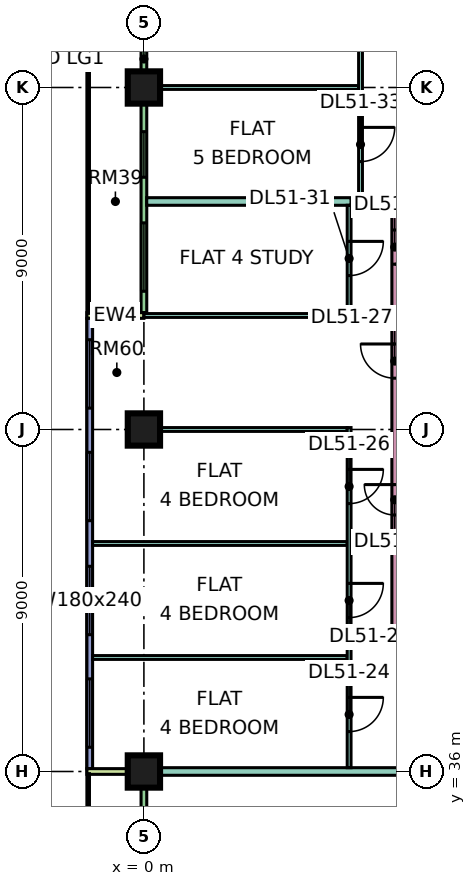
"""IFC4 building model, lengths in metres.
Left out: names, types, materials, properties, quantities, classifications, styles, units other than length and angle.
Written with IfcOpenShell. Run it as: python <this file> out.ifc"""

import sys

from ifc_helpers import new_model, si_unit, direction, frame, frame_2d, origin, origin_2d, place, context, subcontext, project, spatial, rectangle, extrude, element, fill, save


model = new_model("IFC4")
c1 = context("Model", 3, precision=1e-05, world=origin(), true_north=direction((0.0, 1.0)))
c2 = subcontext(c1, "Body", "Model", "MODEL_VIEW")
j1 = project(units=[si_unit("LENGTHUNIT", "METRE"), si_unit("PLANEANGLEUNIT", "RADIAN")], contexts=[c1])
p1 = place(None, origin())
s1 = spatial("IfcSite", under=j1, at=p1, CompositionType="ELEMENT")
p2 = place(p1, origin())
s2 = spatial("IfcBuilding", under=s1, at=p2, CompositionType="ELEMENT")
p3 = place(p2, frame((0.0, 0.0, 219.15)))
s3 = spatial("IfcBuildingStorey", under=s2, at=p3, CompositionType="ELEMENT", Elevation=219.15)
p4 = place(p3, frame((0.0, 36.0, 0.0), z_axis=(0.0, 0.0, 1.0), x_axis=(1.0, 0.0, 0.0)))
e1 = element("IfcColumn", 1, at=p4, inside=s3, PredefinedType="COLUMN", context=c2, shape_type="SweptSolid", body=[
    extrude(rectangle(XDim=0.85, YDim=0.85, at=origin_2d()), origin(), (0.0, 0.0, 1.0), 3.75),
])
p5 = place(p3, frame((0.0, 45.0, 0.0), z_axis=(0.0, 0.0, 1.0), x_axis=(1.0, 0.0, 0.0)))
e2 = element("IfcColumn", 2, at=p5, inside=s3, PredefinedType="COLUMN", context=c2, shape_type="SweptSolid", body=[
    extrude(rectangle(XDim=0.85, YDim=0.85, at=origin_2d()), origin(), (0.0, 0.0, 1.0), 3.75),
])
p6 = place(p3, frame((0.0, 54.0, 0.0), z_axis=(0.0, 0.0, 1.0), x_axis=(1.0, 0.0, 0.0)))
e3 = element("IfcColumn", 3, at=p6, inside=s3, PredefinedType="COLUMN", context=c2, shape_type="SweptSolid", body=[
    extrude(rectangle(XDim=0.85, YDim=0.85, at=origin_2d()), origin(), (0.0, 0.0, 1.0), 3.75),
])
p7 = place(p3, frame((0.0, 61.425, 0.0), z_axis=(0.0, 0.0, 1.0), x_axis=(0.0, -1.0, 0.0)))
e4 = element("IfcWall", 4, at=p7, inside=s3, PredefinedType="SOLIDWALL", context=c2, shape_type="SweptSolid", body=[
    extrude(rectangle(XDim=13.35, YDim=0.15, at=frame_2d((6.675, 0.0))), origin(), (0.0, 0.0, 1.0), 3.35),
])
p8 = place(p7, frame((2.025, 0.0, 0.0)))
e5 = element("IfcOpeningElement", 5, at=p8, cuts=e4, PredefinedType="OPENING", context=c2, shape_type="SweptSolid", body=[
    extrude(rectangle(XDim=1.8, YDim=2.4, at=frame_2d((0.9, 1.2))), frame((0.0, 0.085, 0.0), z_axis=(0.0, -1.0, 0.0), x_axis=(1.0, 0.0, 0.0)), (0.0, 0.0, 1.0), 0.17),
])
p9 = place(p7, frame((5.062, 0.0, 0.45)))
e6 = element("IfcOpeningElement", 6, at=p9, cuts=e4, PredefinedType="OPENING", context=c2, shape_type="SweptSolid", body=[
    extrude(rectangle(XDim=1.2, YDim=2.4, at=frame_2d((0.6, 1.2))), frame((0.0, 0.085, 0.0), z_axis=(0.0, -1.0, 0.0), x_axis=(1.0, 0.0, 0.0)), (0.0, 0.0, 1.0), 0.17),
])
p10 = place(p7, frame((8.587, 0.0, 0.45)))
e7 = element("IfcOpeningElement", 7, at=p10, cuts=e4, PredefinedType="OPENING", context=c2, shape_type="SweptSolid", body=[
    extrude(rectangle(XDim=1.2, YDim=2.4, at=frame_2d((0.6, 1.2))), frame((0.0, 0.085, 0.0), z_axis=(0.0, -1.0, 0.0), x_axis=(1.0, 0.0, 0.0)), (0.0, 0.0, 1.0), 0.17),
])
p11 = place(p7, frame((10.988, 0.0, 0.45)))
e8 = element("IfcOpeningElement", 8, at=p11, cuts=e4, PredefinedType="OPENING", context=c2, shape_type="SweptSolid", body=[
    extrude(rectangle(XDim=1.8, YDim=2.4, at=frame_2d((0.9, 1.2))), frame((0.0, 0.085, 0.0), z_axis=(0.0, -1.0, 0.0), x_axis=(1.0, 0.0, 0.0)), (0.0, 0.0, 1.0), 0.17),
])
p12 = place(p3, frame((-1.5, 48.0, 0.0), z_axis=(0.0, 0.0, 1.0), x_axis=(1.0, 0.0, 0.0)))
e9 = element("IfcWall", 9, at=p12, inside=s3, PredefinedType="SOLIDWALL", context=c2, shape_type="SweptSolid", body=[
    extrude(rectangle(XDim=1.5, YDim=0.15, at=frame_2d((0.75, 0.0))), origin(), (0.0, 0.0, 1.0), 3.35),
])
p13 = place(p3, frame((-1.425, 47.925, 0.0), z_axis=(0.0, 0.0, 1.0), x_axis=(0.0, -1.0, 0.0)))
e10 = element("IfcWall", 10, at=p13, inside=s3, PredefinedType="SOLIDWALL", context=c2, shape_type="SweptSolid", body=[
    extrude(rectangle(XDim=11.85, YDim=0.15, at=frame_2d((5.925, 0.0))), origin(), (0.0, 0.0, 1.0), 3.35),
])
p14 = place(p13, frame((0.562, 0.0, 0.45)))
e11 = element("IfcOpeningElement", 11, at=p14, cuts=e10, PredefinedType="OPENING", context=c2, shape_type="SweptSolid", body=[
    extrude(rectangle(XDim=1.8, YDim=2.4, at=frame_2d((0.9, 1.2))), frame((0.0, 0.085, 0.0), z_axis=(0.0, -1.0, 0.0), x_axis=(1.0, 0.0, 0.0)), (0.0, 0.0, 1.0), 0.17),
])
p15 = place(p13, frame((3.525, 0.0, 0.45)))
e12 = element("IfcOpeningElement", 12, at=p15, cuts=e10, PredefinedType="OPENING", context=c2, shape_type="SweptSolid", body=[
    extrude(rectangle(XDim=1.8, YDim=2.4, at=frame_2d((0.9, 1.2))), frame((0.0, 0.085, 0.0), z_axis=(0.0, -1.0, 0.0), x_axis=(1.0, 0.0, 0.0)), (0.0, 0.0, 1.0), 0.17),
])
p16 = place(p13, frame((6.525, 0.0, 0.45)))
e13 = element("IfcOpeningElement", 13, at=p16, cuts=e10, PredefinedType="OPENING", context=c2, shape_type="SweptSolid", body=[
    extrude(rectangle(XDim=1.8, YDim=2.4, at=frame_2d((0.9, 1.2))), frame((0.0, 0.085, 0.0), z_axis=(0.0, -1.0, 0.0), x_axis=(1.0, 0.0, 0.0)), (0.0, 0.0, 1.0), 0.17),
])
p17 = place(p13, frame((9.488, 0.0, 0.45)))
e14 = element("IfcOpeningElement", 14, at=p17, cuts=e10, PredefinedType="OPENING", context=c2, shape_type="SweptSolid", body=[
    extrude(rectangle(XDim=1.8, YDim=2.4, at=frame_2d((0.9, 1.2))), frame((0.0, 0.085, 0.0), z_axis=(0.0, -1.0, 0.0), x_axis=(1.0, 0.0, 0.0)), (0.0, 0.0, 1.0), 0.17),
])
p18 = place(p3, frame((0.0, 35.925, 0.0), z_axis=(0.0, 0.0, 1.0), x_axis=(0.0, -1.0, 0.0)))
e15 = element("IfcWall", 15, at=p18, inside=s3, PredefinedType="SOLIDWALL", context=c2, shape_type="SweptSolid", body=[
    extrude(rectangle(XDim=11.85, YDim=0.15, at=frame_2d((5.925, 0.0))), origin(), (0.0, 0.0, 1.0), 3.35),
])
p19 = place(p18, frame((2.288, 0.0, 0.0)))
e16 = element("IfcOpeningElement", 16, at=p19, cuts=e15, PredefinedType="OPENING", context=c2, shape_type="SweptSolid", body=[
    extrude(rectangle(XDim=1.8, YDim=2.4, at=frame_2d((0.9, 1.2))), frame((0.0, 0.085, 0.0), z_axis=(0.0, -1.0, 0.0), x_axis=(1.0, 0.0, 0.0)), (0.0, 0.0, 1.0), 0.17),
])
p20 = place(p18, frame((6.525, 0.0, 0.45)))
e17 = element("IfcOpeningElement", 17, at=p20, cuts=e15, PredefinedType="OPENING", context=c2, shape_type="SweptSolid", body=[
    extrude(rectangle(XDim=1.8, YDim=2.4, at=frame_2d((0.9, 1.2))), frame((0.0, 0.085, 0.0), z_axis=(0.0, -1.0, 0.0), x_axis=(1.0, 0.0, 0.0)), (0.0, 0.0, 1.0), 0.17),
])
p21 = place(p18, frame((9.562, 0.0, 0.45)))
e18 = element("IfcOpeningElement", 18, at=p21, cuts=e15, PredefinedType="OPENING", context=c2, shape_type="SweptSolid", body=[
    extrude(rectangle(XDim=1.2, YDim=2.4, at=frame_2d((0.6, 1.2))), frame((0.0, 0.085, 0.0), z_axis=(0.0, -1.0, 0.0), x_axis=(1.0, 0.0, 0.0)), (0.0, 0.0, 1.0), 0.17),
])
p22 = place(p3, frame((-1.5, 36.0, 0.0), z_axis=(0.0, 0.0, 1.0), x_axis=(1.0, 0.0, 0.0)))
e19 = element("IfcWall", 19, at=p22, inside=s3, PredefinedType="SOLIDWALL", context=c2, shape_type="SweptSolid", body=[
    extrude(rectangle(XDim=1.5, YDim=0.15, at=frame_2d((0.75, 0.0))), origin(), (0.0, 0.0, 1.0), 3.35),
])
for number, where, z_axis, x_axis in (
    (20, (-1.351, 39.0, 0.0), (0.0, 0.0, 1.0), (1.0, 0.0, 0.0)),
    (21, (-1.351, 42.0, 0.0), (0.0, 0.0, 1.0), (1.0, 0.0, 0.0)),
):
    element("IfcWall", number, at=place(p3, frame(where, z_axis=z_axis, x_axis=x_axis)), inside=s3, PredefinedType="PARTITIONING", context=c2, shape_type="SweptSolid", body=[
        extrude(rectangle(XDim=6.701, YDim=0.1, at=frame_2d((3.351, 0.0))), origin(), (0.0, 0.0, 1.0), 3.35),
    ])
e22 = element("IfcWall", 22, at=p4, inside=s3, PredefinedType="PARTITIONING", context=c2, shape_type="SweptSolid", body=[
    extrude(rectangle(XDim=9.5, YDim=0.2, at=frame_2d((4.75, 0.0))), origin(), (0.0, 0.0, 1.0), 3.35),
])
e23 = element("IfcWall", 23, at=p5, inside=s3, PredefinedType="PARTITIONING", context=c2, shape_type="SweptSolid", body=[
    extrude(rectangle(XDim=5.35, YDim=0.1, at=frame_2d((2.675, 0.0))), origin(), (0.0, 0.0, 1.0), 3.35),
])
p23 = place(p3, frame((0.0, 48.0, 0.0), z_axis=(0.0, 0.0, 1.0), x_axis=(1.0, 0.0, 0.0)))
e24 = element("IfcWall", 24, at=p23, inside=s3, PredefinedType="PARTITIONING", context=c2, shape_type="SweptSolid", body=[
    extrude(rectangle(XDim=5.45, YDim=0.1, at=frame_2d((2.725, 0.0))), origin(), (0.0, 0.0, 1.0), 3.35),
])
p24 = place(p3, frame((0.074, 51.0, 0.0), z_axis=(0.0, 0.0, 1.0), x_axis=(1.0, 0.0, 0.0)))
e25 = element("IfcWall", 25, at=p24, inside=s3, PredefinedType="PARTITIONING", context=c2, shape_type="SweptSolid", body=[
    extrude(rectangle(XDim=5.376, YDim=0.2, at=frame_2d((2.688, 0.0))), origin(), (0.0, 0.0, 1.0), 3.35),
])
p25 = place(p3, frame((0.074, 54.0, 0.0), z_axis=(0.0, 0.0, 1.0), x_axis=(1.0, 0.0, 0.0)))
e26 = element("IfcWall", 26, at=p25, inside=s3, PredefinedType="PARTITIONING", context=c2, shape_type="SweptSolid", body=[
    extrude(rectangle(XDim=5.576, YDim=0.1, at=frame_2d((2.788, 0.0))), origin(), (0.0, 0.0, 1.0), 3.35),
])
p26 = place(p3, frame((5.4, 36.1, 0.0), z_axis=(0.0, 0.0, 1.0), x_axis=(0.0, 1.0, 0.0)))
e27 = element("IfcWall", 27, at=p26, inside=s3, PredefinedType="PARTITIONING", context=c2, shape_type="SweptSolid", body=[
    extrude(rectangle(XDim=8.95, YDim=0.1, at=frame_2d((4.475, 0.0))), origin(), (0.0, 0.0, 1.0), 3.35),
])
p27 = place(p26, frame((0.95, 0.0, 0.0)))
e28 = element("IfcOpeningElement", 28, at=p27, cuts=e27, PredefinedType="OPENING", context=c2, shape_type="SweptSolid", body=[
    extrude(rectangle(XDim=0.9, YDim=2.1, at=frame_2d((0.45, 1.05))), frame((0.0, 0.06, 0.0), z_axis=(0.0, -1.0, 0.0), x_axis=(1.0, 0.0, 0.0)), (0.0, 0.0, 1.0), 0.12),
])
p28 = place(p26, frame((3.95, 0.0, 0.0)))
e29 = element("IfcOpeningElement", 29, at=p28, cuts=e27, PredefinedType="OPENING", context=c2, shape_type="SweptSolid", body=[
    extrude(rectangle(XDim=0.9, YDim=2.1, at=frame_2d((0.45, 1.05))), frame((0.0, 0.06, 0.0), z_axis=(0.0, -1.0, 0.0), x_axis=(1.0, 0.0, 0.0)), (0.0, 0.0, 1.0), 0.12),
])
p29 = place(p26, frame((6.95, 0.0, 0.0)))
e30 = element("IfcOpeningElement", 30, at=p29, cuts=e27, PredefinedType="OPENING", context=c2, shape_type="SweptSolid", body=[
    extrude(rectangle(XDim=0.9, YDim=2.1, at=frame_2d((0.45, 1.05))), frame((0.0, 0.06, 0.0), z_axis=(0.0, -1.0, 0.0), x_axis=(1.0, 0.0, 0.0)), (0.0, 0.0, 1.0), 0.12),
])
p30 = place(p3, frame((5.4, 48.05, 0.0), z_axis=(0.0, 0.0, 1.0), x_axis=(0.0, 1.0, 0.0)))
e31 = element("IfcWall", 31, at=p30, inside=s3, PredefinedType="PARTITIONING", context=c2, shape_type="SweptSolid", body=[
    extrude(rectangle(XDim=2.85, YDim=0.1, at=frame_2d((1.425, 0.0))), origin(), (0.0, 0.0, 1.0), 3.35),
])
p31 = place(p30, frame((1.0, 0.0, 0.0)))
e32 = element("IfcOpeningElement", 32, at=p31, cuts=e31, PredefinedType="OPENING", context=c2, shape_type="SweptSolid", body=[
    extrude(rectangle(XDim=0.9, YDim=2.1, at=frame_2d((0.45, 1.05))), frame((0.0, 0.06, 0.0), z_axis=(0.0, -1.0, 0.0), x_axis=(1.0, 0.0, 0.0)), (0.0, 0.0, 1.0), 0.12),
])
p32 = place(p3, frame((5.65, 51.0, 0.0), z_axis=(0.0, 0.0, 1.0), x_axis=(1.0, 0.0, 0.0)))
e33 = element("IfcWall", 33, at=p32, inside=s3, PredefinedType="PARTITIONING", context=c2, shape_type="SweptSolid", body=[
    extrude(rectangle(XDim=3.85, YDim=0.2, at=frame_2d((1.925, 0.0))), origin(), (0.0, 0.0, 1.0), 3.35),
])
p33 = place(p3, frame((5.7, 51.1, 0.0), z_axis=(0.0, 0.0, 1.0), x_axis=(0.0, 1.0, 0.0)))
e34 = element("IfcWall", 34, at=p33, inside=s3, PredefinedType="PARTITIONING", context=c2, shape_type="SweptSolid", body=[
    extrude(rectangle(XDim=8.95, YDim=0.1, at=frame_2d((4.475, 0.0))), origin(), (0.0, 0.0, 1.0), 3.35),
])
p34 = place(p33, frame((0.95, 0.0, 0.0)))
e35 = element("IfcOpeningElement", 35, at=p34, cuts=e34, PredefinedType="OPENING", context=c2, shape_type="SweptSolid", body=[
    extrude(rectangle(XDim=0.9, YDim=2.1, at=frame_2d((0.45, 1.05))), frame((0.0, 0.06, 0.0), z_axis=(0.0, -1.0, 0.0), x_axis=(1.0, 0.0, 0.0)), (0.0, 0.0, 1.0), 0.12),
])
p35 = place(p33, frame((3.95, 0.0, 0.0)))
e36 = element("IfcOpeningElement", 36, at=p35, cuts=e34, PredefinedType="OPENING", context=c2, shape_type="SweptSolid", body=[
    extrude(rectangle(XDim=0.9, YDim=2.1, at=frame_2d((0.45, 1.05))), frame((0.0, 0.06, 0.0), z_axis=(0.0, -1.0, 0.0), x_axis=(1.0, 0.0, 0.0)), (0.0, 0.0, 1.0), 0.12),
])
p36 = place(p33, frame((6.95, 0.0, 0.0)))
e37 = element("IfcOpeningElement", 37, at=p36, cuts=e34, PredefinedType="OPENING", context=c2, shape_type="SweptSolid", body=[
    extrude(rectangle(XDim=0.9, YDim=2.1, at=frame_2d((0.45, 1.05))), frame((0.0, 0.06, 0.0), z_axis=(0.0, -1.0, 0.0), x_axis=(1.0, 0.0, 0.0)), (0.0, 0.0, 1.0), 0.12),
])
p37 = place(p3, frame((6.6, 39.25, 0.0), z_axis=(0.0, 0.0, 1.0), x_axis=(0.0, 1.0, 0.0)))
e38 = element("IfcWall", 38, at=p37, inside=s3, PredefinedType="PARTITIONING", context=c2, shape_type="SweptSolid", body=[
    extrude(rectangle(XDim=11.65, YDim=0.15, at=frame_2d((5.825, 0.0))), origin(), (0.0, 0.0, 1.0), 3.35),
])
p38 = place(p37, frame((3.5, 0.0, 0.0)))
e39 = element("IfcOpeningElement", 39, at=p38, cuts=e38, PredefinedType="OPENING", context=c2, shape_type="SweptSolid", body=[
    extrude(rectangle(XDim=0.8, YDim=2.1, at=frame_2d((0.4, 1.05))), frame((0.0, 0.085, 0.0), z_axis=(0.0, -1.0, 0.0), x_axis=(1.0, 0.0, 0.0)), (0.0, 0.0, 1.0), 0.17),
])
p39 = place(p37, frame((7.1, 0.0, 0.0)))
e40 = element("IfcOpeningElement", 40, at=p39, cuts=e38, PredefinedType="OPENING", context=c2, shape_type="SweptSolid", body=[
    extrude(rectangle(XDim=0.9, YDim=2.1, at=frame_2d((0.45, 1.05))), frame((0.0, 0.085, 0.0), z_axis=(0.0, -1.0, 0.0), x_axis=(1.0, 0.0, 0.0)), (0.0, 0.0, 1.0), 0.17),
])
p40 = place(p37, frame((10.1, 0.0, 0.0)))
e41 = element("IfcOpeningElement", 41, at=p40, cuts=e38, PredefinedType="OPENING", context=c2, shape_type="SweptSolid", body=[
    extrude(rectangle(XDim=0.9, YDim=2.1, at=frame_2d((0.45, 1.05))), frame((0.0, 0.085, 0.0), z_axis=(0.0, -1.0, 0.0), x_axis=(1.0, 0.0, 0.0)), (0.0, 0.0, 1.0), 0.17),
])
p41 = place(p10, origin())
e42 = element("IfcWindow", 42, at=p41, inside=s3, PartitioningType="SINGLE_PANEL", PredefinedType="WINDOW", context=c2, shape_type="SweptSolid", body=[
    extrude(rectangle(XDim=1.2, YDim=2.4, at=frame_2d((0.6, 1.2))), frame((0.0, 0.03, 0.0), z_axis=(0.0, -1.0, 0.0), x_axis=(1.0, 0.0, 0.0)), (0.0, 0.0, 1.0), 0.06),
])
fill(e7, e42)
p42 = place(p11, origin())
e43 = element("IfcWindow", 43, at=p42, inside=s3, PartitioningType="SINGLE_PANEL", PredefinedType="WINDOW", context=c2, shape_type="SweptSolid", body=[
    extrude(rectangle(XDim=1.8, YDim=2.4, at=frame_2d((0.9, 1.2))), frame((0.0, 0.03, 0.0), z_axis=(0.0, -1.0, 0.0), x_axis=(1.0, 0.0, 0.0)), (0.0, 0.0, 1.0), 0.06),
])
fill(e8, e43)
p43 = place(p14, origin())
e44 = element("IfcWindow", 44, at=p43, inside=s3, PartitioningType="SINGLE_PANEL", PredefinedType="WINDOW", context=c2, shape_type="SweptSolid", body=[
    extrude(rectangle(XDim=1.8, YDim=2.4, at=frame_2d((0.9, 1.2))), frame((0.0, 0.03, 0.0), z_axis=(0.0, -1.0, 0.0), x_axis=(1.0, 0.0, 0.0)), (0.0, 0.0, 1.0), 0.06),
])
fill(e11, e44)
p44 = place(p15, origin())
e45 = element("IfcWindow", 45, at=p44, inside=s3, PartitioningType="SINGLE_PANEL", PredefinedType="WINDOW", context=c2, shape_type="SweptSolid", body=[
    extrude(rectangle(XDim=1.8, YDim=2.4, at=frame_2d((0.9, 1.2))), frame((0.0, 0.03, 0.0), z_axis=(0.0, -1.0, 0.0), x_axis=(1.0, 0.0, 0.0)), (0.0, 0.0, 1.0), 0.06),
])
fill(e12, e45)
p45 = place(p16, origin())
e46 = element("IfcWindow", 46, at=p45, inside=s3, PartitioningType="SINGLE_PANEL", PredefinedType="WINDOW", context=c2, shape_type="SweptSolid", body=[
    extrude(rectangle(XDim=1.8, YDim=2.4, at=frame_2d((0.9, 1.2))), frame((0.0, 0.03, 0.0), z_axis=(0.0, -1.0, 0.0), x_axis=(1.0, 0.0, 0.0)), (0.0, 0.0, 1.0), 0.06),
])
fill(e13, e46)
p46 = place(p17, origin())
e47 = element("IfcWindow", 47, at=p46, inside=s3, PartitioningType="SINGLE_PANEL", PredefinedType="WINDOW", context=c2, shape_type="SweptSolid", body=[
    extrude(rectangle(XDim=1.8, YDim=2.4, at=frame_2d((0.9, 1.2))), frame((0.0, 0.03, 0.0), z_axis=(0.0, -1.0, 0.0), x_axis=(1.0, 0.0, 0.0)), (0.0, 0.0, 1.0), 0.06),
])
fill(e14, e47)
p47 = place(p38, frame((0.8, 0.0, 0.0), z_axis=(0.0, 0.0, 1.0), x_axis=(-1.0, 0.0, 0.0)))
e48 = element("IfcDoor", 48, at=p47, inside=s3, OperationType="SINGLE_SWING_RIGHT", PredefinedType="DOOR", context=c2, shape_type="SweptSolid", body=[
    extrude(rectangle(XDim=0.8, YDim=2.1, at=frame_2d((0.4, 1.05))), frame((0.0, 0.025, 0.0), z_axis=(0.0, -1.0, 0.0), x_axis=(1.0, 0.0, 0.0)), (0.0, 0.0, 1.0), 0.05),
])
fill(e39, e48)
p48 = place(p27, origin())
e49 = element("IfcDoor", 49, at=p48, inside=s3, OperationType="SINGLE_SWING_RIGHT", PredefinedType="DOOR", context=c2, shape_type="SweptSolid", body=[
    extrude(rectangle(XDim=0.9, YDim=2.1, at=frame_2d((0.45, 1.05))), frame((0.0, 0.025, 0.0), z_axis=(0.0, -1.0, 0.0), x_axis=(1.0, 0.0, 0.0)), (0.0, 0.0, 1.0), 0.05),
])
fill(e28, e49)
p49 = place(p28, origin())
e50 = element("IfcDoor", 50, at=p49, inside=s3, OperationType="SINGLE_SWING_RIGHT", PredefinedType="DOOR", context=c2, shape_type="SweptSolid", body=[
    extrude(rectangle(XDim=0.9, YDim=2.1, at=frame_2d((0.45, 1.05))), frame((0.0, 0.025, 0.0), z_axis=(0.0, -1.0, 0.0), x_axis=(1.0, 0.0, 0.0)), (0.0, 0.0, 1.0), 0.05),
])
fill(e29, e50)
p50 = place(p29, origin())
e51 = element("IfcDoor", 51, at=p50, inside=s3, OperationType="SINGLE_SWING_RIGHT", PredefinedType="DOOR", context=c2, shape_type="SweptSolid", body=[
    extrude(rectangle(XDim=0.9, YDim=2.1, at=frame_2d((0.45, 1.05))), frame((0.0, 0.025, 0.0), z_axis=(0.0, -1.0, 0.0), x_axis=(1.0, 0.0, 0.0)), (0.0, 0.0, 1.0), 0.05),
])
fill(e30, e51)
p51 = place(p39, frame((0.9, 0.0, 0.0), z_axis=(0.0, 0.0, 1.0), x_axis=(-1.0, 0.0, 0.0)))
e52 = element("IfcDoor", 52, at=p51, inside=s3, OperationType="SINGLE_SWING_RIGHT", PredefinedType="DOOR", context=c2, shape_type="SweptSolid", body=[
    extrude(rectangle(XDim=0.9, YDim=2.1, at=frame_2d((0.45, 1.05))), frame((0.0, 0.025, 0.0), z_axis=(0.0, -1.0, 0.0), x_axis=(1.0, 0.0, 0.0)), (0.0, 0.0, 1.0), 0.05),
])
fill(e40, e52)
p52 = place(p40, frame((0.9, 0.0, 0.0), z_axis=(0.0, 0.0, 1.0), x_axis=(-1.0, 0.0, 0.0)))
e53 = element("IfcDoor", 53, at=p52, inside=s3, OperationType="SINGLE_SWING_LEFT", PredefinedType="DOOR", context=c2, shape_type="SweptSolid", body=[
    extrude(rectangle(XDim=0.9, YDim=2.1, at=frame_2d((0.45, 1.05))), frame((0.0, 0.025, 0.0), z_axis=(0.0, -1.0, 0.0), x_axis=(1.0, 0.0, 0.0)), (0.0, 0.0, 1.0), 0.05),
])
fill(e41, e53)
p53 = place(p31, origin())
e54 = element("IfcDoor", 54, at=p53, inside=s3, OperationType="SINGLE_SWING_RIGHT", PredefinedType="DOOR", context=c2, shape_type="SweptSolid", body=[
    extrude(rectangle(XDim=0.9, YDim=2.1, at=frame_2d((0.45, 1.05))), frame((0.0, 0.025, 0.0), z_axis=(0.0, -1.0, 0.0), x_axis=(1.0, 0.0, 0.0)), (0.0, 0.0, 1.0), 0.05),
])
fill(e32, e54)
p54 = place(p34, origin())
e55 = element("IfcDoor", 55, at=p54, inside=s3, OperationType="SINGLE_SWING_RIGHT", PredefinedType="DOOR", context=c2, shape_type="SweptSolid", body=[
    extrude(rectangle(XDim=0.9, YDim=2.1, at=frame_2d((0.45, 1.05))), frame((0.0, 0.025, 0.0), z_axis=(0.0, -1.0, 0.0), x_axis=(1.0, 0.0, 0.0)), (0.0, 0.0, 1.0), 0.05),
])
fill(e35, e55)
save(model, sys.argv[1])
